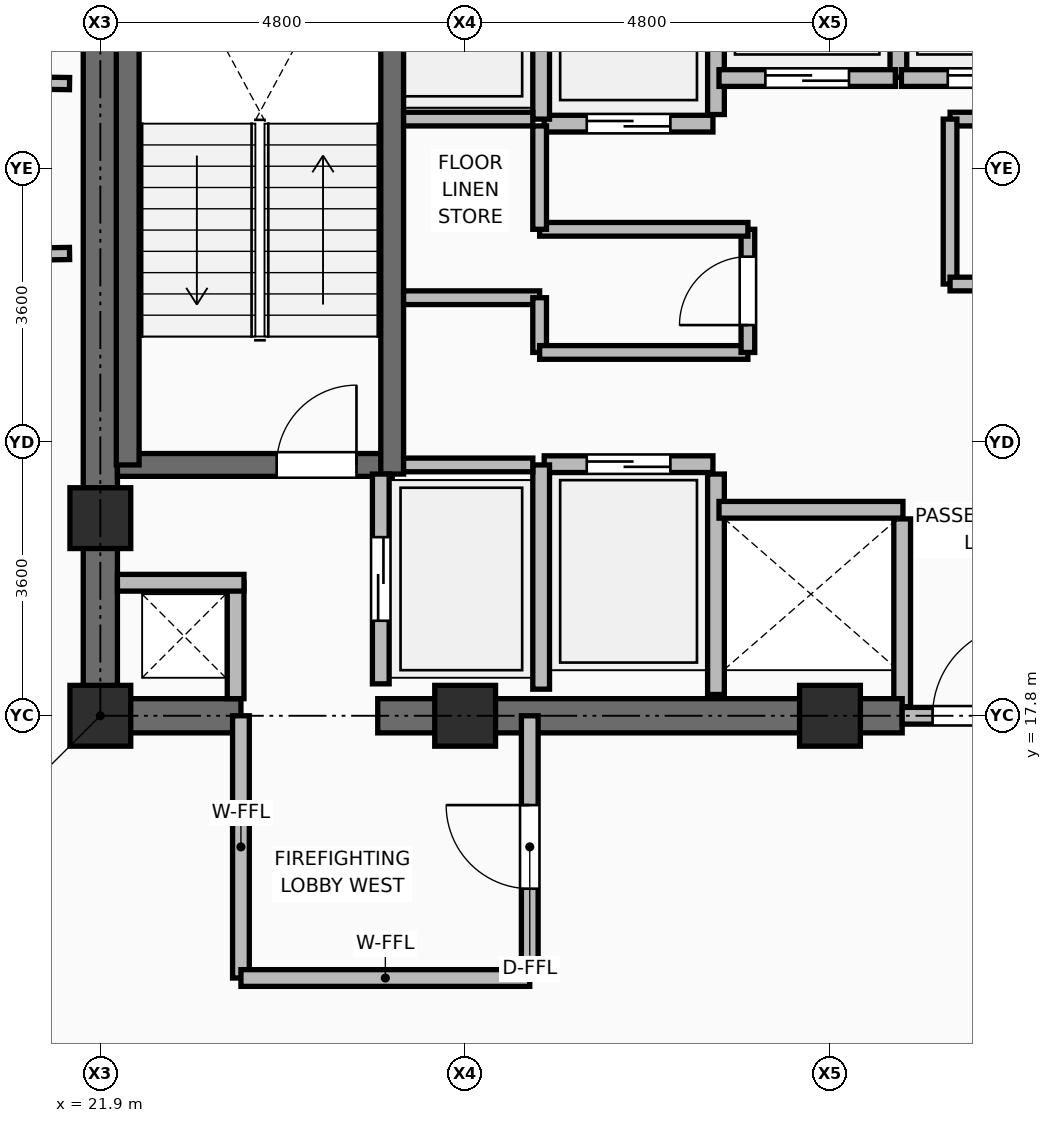
"""IFC4 building model, lengths in metres.
Left out: names, types, materials, properties, quantities, classifications, styles, units other than length and angle.
Written with IfcOpenShell. Run it as: python <this file> out.ifc"""

import sys

from ifc_helpers import new_model, si_unit, direction, frame, frame_2d, origin, origin_2d, place, context, subcontext, project, spatial, rectangle, extrude, element, fill, save


model = new_model("IFC4")
c1 = context("Model", 3, precision=1e-05, world=origin(), true_north=direction((0.0, 1.0)))
c2 = subcontext(c1, "Body", "Model", "MODEL_VIEW")
j1 = project(units=[si_unit("LENGTHUNIT", "METRE"), si_unit("PLANEANGLEUNIT", "RADIAN")], contexts=[c1])
p1 = place(None, origin())
s1 = spatial("IfcSite", under=j1, at=p1, CompositionType="ELEMENT")
p2 = place(p1, origin())
s2 = spatial("IfcBuilding", under=s1, at=p2, CompositionType="ELEMENT")
p3 = place(p2, frame((0.0, 0.0, 242.4)))
s3 = spatial("IfcBuildingStorey", under=s2, at=p3, CompositionType="ELEMENT", Elevation=242.4)
for number, where, z_axis, x_axis in (
    (1, (21.9, 17.8, 0.0), (0.0, 0.0, 1.0), (1.0, 0.0, 0.0)),
    (2, (26.7, 17.8, 0.0), (0.0, 0.0, 1.0), (1.0, 0.0, 0.0)),
    (3, (31.5, 17.8, 0.0), (0.0, 0.0, 1.0), (1.0, 0.0, 0.0)),
    (4, (21.9, 20.4, 0.0), (0.0, 0.0, 1.0), (1.0, 0.0, 0.0)),
):
    element("IfcColumn", number, at=place(p3, frame(where, z_axis=z_axis, x_axis=x_axis)), inside=s3, PredefinedType="COLUMN", context=c2, shape_type="SweptSolid", body=[
        extrude(rectangle(XDim=0.8, YDim=0.8, at=origin_2d()), origin(), (0.0, 0.0, 1.0), 3.75),
    ])
p4 = place(p3, frame((30.0, 18.08, 0.0), z_axis=(0.0, 0.0, 1.0), x_axis=(0.0, 1.0, 0.0)))
e5 = element("IfcWall", 5, at=p4, inside=s3, PredefinedType="PARTITIONING", context=c2, shape_type="SweptSolid", body=[
    extrude(rectangle(XDim=2.9, YDim=0.22, at=frame_2d((1.45, 0.0))), origin(), (0.0, 0.0, 1.0), 3.545),
])
p5 = place(p3, frame((32.45, 17.92, 0.0), z_axis=(0.0, 0.0, 1.0), x_axis=(0.0, 1.0, 0.0)))
e6 = element("IfcWall", 6, at=p5, inside=s3, PredefinedType="PARTITIONING", context=c2, shape_type="SweptSolid", body=[
    extrude(rectangle(XDim=2.47, YDim=0.22, at=frame_2d((1.235, 0.0))), origin(), (0.0, 0.0, 1.0), 3.545),
])
p6 = place(p3, frame((30.0, 25.71, 0.0), z_axis=(0.0, 0.0, 1.0), x_axis=(0.0, 1.0, 0.0)))
e7 = element("IfcWall", 7, at=p6, inside=s3, PredefinedType="PARTITIONING", context=c2, shape_type="SweptSolid", body=[
    extrude(rectangle(XDim=2.73, YDim=0.22, at=frame_2d((1.365, 0.0))), origin(), (0.0, 0.0, 1.0), 3.545),
])
p7 = place(p3, frame((32.4, 26.2, 0.0), z_axis=(0.0, 0.0, 1.0), x_axis=(0.0, 1.0, 0.0)))
e8 = element("IfcWall", 8, at=p7, inside=s3, PredefinedType="PARTITIONING", context=c2, shape_type="SweptSolid", body=[
    extrude(rectangle(XDim=2.24, YDim=0.22, at=frame_2d((1.12, 0.0))), origin(), (0.0, 0.0, 1.0), 3.545),
])
p8 = place(p3, frame((21.675, 17.8, 0.0), z_axis=(0.0, 0.0, 1.0), x_axis=(1.0, 0.0, 0.0)))
e9 = element("IfcWall", 9, at=p8, inside=s3, PredefinedType="SHEAR", context=c2, shape_type="SweptSolid", body=[
    extrude(rectangle(XDim=2.075, YDim=0.45, at=frame_2d((1.038, 0.0))), origin(), (0.0, 0.0, 1.0), 3.57),
])
p9 = place(p3, frame((25.55, 17.8, 0.0), z_axis=(0.0, 0.0, 1.0), x_axis=(1.0, 0.0, 0.0)))
e10 = element("IfcWall", 10, at=p9, inside=s3, PredefinedType="SHEAR", context=c2, shape_type="SweptSolid", body=[
    extrude(rectangle(XDim=6.9, YDim=0.45, at=frame_2d((3.45, 0.0))), origin(), (0.0, 0.0, 1.0), 3.57),
])
p10 = place(p3, frame((32.45, 17.8, 0.0), z_axis=(0.0, 0.0, 1.0), x_axis=(1.0, 0.0, 0.0)))
e11 = element("IfcWall", 11, at=p10, inside=s3, PredefinedType="PARTITIONING", context=c2, shape_type="SweptSolid", body=[
    extrude(rectangle(XDim=2.5, YDim=0.22, at=frame_2d((1.25, 0.0))), origin(), (0.0, 0.0, 1.0), 3.081),
])
p11 = place(p10, frame((0.4, 0.0, 0.0)))
e12 = element("IfcOpeningElement", 12, at=p11, cuts=e11, PredefinedType="OPENING", context=c2, shape_type="SweptSolid", body=[
    extrude(rectangle(XDim=1.2, YDim=2.1, at=frame_2d((0.6, 1.05))), frame((0.0, 0.12, 0.0), z_axis=(0.0, -1.0, 0.0), x_axis=(1.0, 0.0, 0.0)), (0.0, 0.0, 1.0), 0.24),
])
p12 = place(p3, frame((21.9, 18.025, 0.0), z_axis=(0.0, 0.0, 1.0), x_axis=(0.0, 1.0, 0.0)))
e13 = element("IfcWall", 13, at=p12, inside=s3, PredefinedType="SHEAR", context=c2, shape_type="SweptSolid", body=[
    extrude(rectangle(XDim=14.2, YDim=0.45, at=frame_2d((7.1, 0.0))), origin(), (0.0, 0.0, 1.0), 3.57),
])
p13 = place(p3, frame((22.125, 21.1, 0.0), z_axis=(0.0, 0.0, 1.0), x_axis=(1.0, 0.0, 0.0)))
e14 = element("IfcWall", 14, at=p13, inside=s3, PredefinedType="SHEAR", context=c2, shape_type="SweptSolid", body=[
    extrude(rectangle(XDim=3.615, YDim=0.3, at=frame_2d((1.808, 0.0))), origin(), (0.0, 0.0, 1.0), 3.57),
])
p14 = place(p13, frame((2.095, 0.0, 0.0)))
e15 = element("IfcOpeningElement", 15, at=p14, cuts=e14, PredefinedType="OPENING", context=c2, shape_type="SweptSolid", body=[
    extrude(rectangle(XDim=1.05, YDim=2.1, at=frame_2d((0.525, 1.05))), frame((0.0, 0.16, 0.0), z_axis=(0.0, -1.0, 0.0), x_axis=(1.0, 0.0, 0.0)), (0.0, 0.0, 1.0), 0.32),
])
p15 = place(p3, frame((25.74, 20.98, 0.0), z_axis=(0.0, 0.0, 1.0), x_axis=(0.0, 1.0, 0.0)))
e16 = element("IfcWall", 16, at=p15, inside=s3, PredefinedType="SHEAR", context=c2, shape_type="SweptSolid", body=[
    extrude(rectangle(XDim=7.99, YDim=0.3, at=frame_2d((3.995, 0.0))), origin(), (0.0, 0.0, 1.0), 3.57),
])
p16 = place(p3, frame((22.26, 21.1, 0.0), z_axis=(0.0, 0.0, 1.0), x_axis=(0.0, 1.0, 0.0)))
e17 = element("IfcWall", 17, at=p16, inside=s3, PredefinedType="SHEAR", context=c2, shape_type="SweptSolid", body=[
    extrude(rectangle(XDim=7.75, YDim=0.3, at=frame_2d((3.875, 0.0))), origin(), (0.0, 0.0, 1.0), 3.57),
])
p17 = place(p3, frame((23.68, 18.025, 0.0), z_axis=(0.0, 0.0, 1.0), x_axis=(0.0, 1.0, 0.0)))
e18 = element("IfcWall", 18, at=p17, inside=s3, PredefinedType="PARTITIONING", context=c2, shape_type="SweptSolid", body=[
    extrude(rectangle(XDim=1.525, YDim=0.22, at=frame_2d((0.763, 0.0))), origin(), (0.0, 0.0, 1.0), 3.55),
])
p18 = place(p3, frame((22.125, 19.55, 0.0), z_axis=(0.0, 0.0, 1.0), x_axis=(1.0, 0.0, 0.0)))
e19 = element("IfcWall", 19, at=p18, inside=s3, PredefinedType="PARTITIONING", context=c2, shape_type="SweptSolid", body=[
    extrude(rectangle(XDim=1.665, YDim=0.22, at=frame_2d((0.833, 0.0))), origin(), (0.0, 0.0, 1.0), 2.595),
])
p19 = place(p3, frame((25.59, 18.22, 0.0), z_axis=(0.0, 0.0, 1.0), x_axis=(0.0, 1.0, 0.0)))
e20 = element("IfcWall", 20, at=p19, inside=s3, PredefinedType="PARTITIONING", context=c2, shape_type="SweptSolid", body=[
    extrude(rectangle(XDim=2.76, YDim=0.22, at=frame_2d((1.38, 0.0))), origin(), (0.0, 0.0, 1.0), 3.55),
])
p20 = place(p19, frame((0.83, 0.0, 0.0)))
e21 = element("IfcOpeningElement", 21, at=p20, cuts=e20, PredefinedType="OPENING", context=c2, shape_type="SweptSolid", body=[
    extrude(rectangle(XDim=1.1, YDim=2.2, at=frame_2d((0.55, 1.1))), frame((0.0, 0.12, 0.0), z_axis=(0.0, -1.0, 0.0), x_axis=(1.0, 0.0, 0.0)), (0.0, 0.0, 1.0), 0.24),
])
p21 = place(p3, frame((27.74, 21.11, 0.0), z_axis=(0.0, 0.0, 1.0), x_axis=(1.0, 0.0, 0.0)))
e22 = element("IfcWall", 22, at=p21, inside=s3, PredefinedType="PARTITIONING", context=c2, shape_type="SweptSolid", body=[
    extrude(rectangle(XDim=2.22, YDim=0.22, at=frame_2d((1.11, 0.0))), origin(), (0.0, 0.0, 1.0), 3.55),
])
p22 = place(p21, frame((0.56, 0.0, 0.0)))
e23 = element("IfcOpeningElement", 23, at=p22, cuts=e22, PredefinedType="OPENING", context=c2, shape_type="SweptSolid", body=[
    extrude(rectangle(XDim=1.1, YDim=2.2, at=frame_2d((0.55, 1.1))), frame((0.0, 0.12, 0.0), z_axis=(0.0, -1.0, 0.0), x_axis=(1.0, 0.0, 0.0)), (0.0, 0.0, 1.0), 0.24),
])
p23 = place(p3, frame((27.74, 25.59, 0.0), z_axis=(0.0, 0.0, 1.0), x_axis=(1.0, 0.0, 0.0)))
e24 = element("IfcWall", 24, at=p23, inside=s3, PredefinedType="PARTITIONING", context=c2, shape_type="SweptSolid", body=[
    extrude(rectangle(XDim=2.22, YDim=0.22, at=frame_2d((1.11, 0.0))), origin(), (0.0, 0.0, 1.0), 3.55),
])
p24 = place(p23, frame((0.56, 0.0, 0.0)))
e25 = element("IfcOpeningElement", 25, at=p24, cuts=e24, PredefinedType="OPENING", context=c2, shape_type="SweptSolid", body=[
    extrude(rectangle(XDim=1.1, YDim=2.2, at=frame_2d((0.55, 1.1))), frame((0.0, 0.12, 0.0), z_axis=(0.0, -1.0, 0.0), x_axis=(1.0, 0.0, 0.0)), (0.0, 0.0, 1.0), 0.24),
])
p25 = place(p3, frame((30.04, 20.51, 0.0), z_axis=(0.0, 0.0, 1.0), x_axis=(1.0, 0.0, 0.0)))
e26 = element("IfcWall", 26, at=p25, inside=s3, PredefinedType="PARTITIONING", context=c2, shape_type="SweptSolid", body=[
    extrude(rectangle(XDim=2.42, YDim=0.22, at=frame_2d((1.21, 0.0))), origin(), (0.0, 0.0, 1.0), 3.55),
])
p26 = place(p3, frame((30.04, 26.19, 0.0), z_axis=(0.0, 0.0, 1.0), x_axis=(1.0, 0.0, 0.0)))
e27 = element("IfcWall", 27, at=p26, inside=s3, PredefinedType="PARTITIONING", context=c2, shape_type="SweptSolid", body=[
    extrude(rectangle(XDim=2.32, YDim=0.22, at=frame_2d((1.16, 0.0))), origin(), (0.0, 0.0, 1.0), 3.55),
])
p27 = place(p26, frame((0.61, 0.0, 0.0)))
e28 = element("IfcOpeningElement", 28, at=p27, cuts=e27, PredefinedType="OPENING", context=c2, shape_type="SweptSolid", body=[
    extrude(rectangle(XDim=1.1, YDim=2.2, at=frame_2d((0.55, 1.1))), frame((0.0, 0.12, 0.0), z_axis=(0.0, -1.0, 0.0), x_axis=(1.0, 0.0, 0.0)), (0.0, 0.0, 1.0), 0.24),
])
p28 = place(p3, frame((32.44, 26.19, 0.0), z_axis=(0.0, 0.0, 1.0), x_axis=(1.0, 0.0, 0.0)))
e29 = element("IfcWall", 29, at=p28, inside=s3, PredefinedType="PARTITIONING", context=c2, shape_type="SweptSolid", body=[
    extrude(rectangle(XDim=2.32, YDim=0.22, at=frame_2d((1.16, 0.0))), origin(), (0.0, 0.0, 1.0), 3.55),
])
p29 = place(p28, frame((0.61, 0.0, 0.0)))
e30 = element("IfcOpeningElement", 30, at=p29, cuts=e29, PredefinedType="OPENING", context=c2, shape_type="SweptSolid", body=[
    extrude(rectangle(XDim=1.1, YDim=2.2, at=frame_2d((0.55, 1.1))), frame((0.0, 0.12, 0.0), z_axis=(0.0, -1.0, 0.0), x_axis=(1.0, 0.0, 0.0)), (0.0, 0.0, 1.0), 0.24),
])
p30 = place(p3, frame((27.7, 18.15, 0.0), z_axis=(0.0, 0.0, 1.0), x_axis=(0.0, 1.0, 0.0)))
e31 = element("IfcWall", 31, at=p30, inside=s3, PredefinedType="PARTITIONING", context=c2, shape_type="SweptSolid", body=[
    extrude(rectangle(XDim=2.95, YDim=0.22, at=frame_2d((1.475, 0.0))), origin(), (0.0, 0.0, 1.0), 3.55),
])
p31 = place(p3, frame((27.7, 25.65, 0.0), z_axis=(0.0, 0.0, 1.0), x_axis=(0.0, 1.0, 0.0)))
e32 = element("IfcWall", 32, at=p31, inside=s3, PredefinedType="PARTITIONING", context=c2, shape_type="SweptSolid", body=[
    extrude(rectangle(XDim=3.0, YDim=0.22, at=frame_2d((1.5, 0.0))), origin(), (0.0, 0.0, 1.0), 3.55),
])
for number, where, z_axis, x_axis in (
    (33, (25.89, 21.1, 0.0), (0.0, 0.0, 1.0), (1.0, 0.0, 0.0)),
    (34, (25.89, 25.65, 0.0), (0.0, 0.0, 1.0), (1.0, 0.0, 0.0)),
):
    element("IfcWall", number, at=place(p3, frame(where, z_axis=z_axis, x_axis=x_axis)), inside=s3, PredefinedType="PARTITIONING", context=c2, shape_type="SweptSolid", body=[
        extrude(rectangle(XDim=1.7, YDim=0.18, at=frame_2d((0.85, 0.0))), origin(), (0.0, 0.0, 1.0), 3.55),
    ])
p32 = place(p3, frame((25.89, 23.3, 0.0), z_axis=(0.0, 0.0, 1.0), x_axis=(1.0, 0.0, 0.0)))
e35 = element("IfcWall", 35, at=p32, inside=s3, PredefinedType="PARTITIONING", context=c2, shape_type="SweptSolid", body=[
    extrude(rectangle(XDim=1.79, YDim=0.18, at=frame_2d((0.895, 0.0))), origin(), (0.0, 0.0, 1.0), 3.55),
])
p33 = place(p3, frame((27.68, 22.58, 0.0), z_axis=(0.0, 0.0, 1.0), x_axis=(0.0, 1.0, 0.0)))
e36 = element("IfcWall", 36, at=p33, inside=s3, PredefinedType="PARTITIONING", context=c2, shape_type="SweptSolid", body=[
    extrude(rectangle(XDim=0.72, YDim=0.18, at=frame_2d((0.36, 0.0))), origin(), (0.0, 0.0, 1.0), 3.55),
])
p34 = place(p3, frame((27.68, 22.58, 0.0), z_axis=(0.0, 0.0, 1.0), x_axis=(1.0, 0.0, 0.0)))
e37 = element("IfcWall", 37, at=p34, inside=s3, PredefinedType="PARTITIONING", context=c2, shape_type="SweptSolid", body=[
    extrude(rectangle(XDim=2.74, YDim=0.18, at=frame_2d((1.37, 0.0))), origin(), (0.0, 0.0, 1.0), 3.55),
])
p35 = place(p3, frame((30.42, 22.58, 0.0), z_axis=(0.0, 0.0, 1.0), x_axis=(0.0, 1.0, 0.0)))
e38 = element("IfcWall", 38, at=p35, inside=s3, PredefinedType="PARTITIONING", context=c2, shape_type="SweptSolid", body=[
    extrude(rectangle(XDim=1.62, YDim=0.18, at=frame_2d((0.81, 0.0))), origin(), (0.0, 0.0, 1.0), 3.55),
])
p36 = place(p35, frame((0.36, 0.0, 0.0)))
e39 = element("IfcOpeningElement", 39, at=p36, cuts=e38, PredefinedType="OPENING", context=c2, shape_type="SweptSolid", body=[
    extrude(rectangle(XDim=0.9, YDim=2.1, at=frame_2d((0.45, 1.05))), frame((0.0, 0.1, 0.0), z_axis=(0.0, -1.0, 0.0), x_axis=(1.0, 0.0, 0.0)), (0.0, 0.0, 1.0), 0.2),
])
p37 = place(p3, frame((27.68, 24.2, 0.0), z_axis=(0.0, 0.0, 1.0), x_axis=(1.0, 0.0, 0.0)))
e40 = element("IfcWall", 40, at=p37, inside=s3, PredefinedType="PARTITIONING", context=c2, shape_type="SweptSolid", body=[
    extrude(rectangle(XDim=2.74, YDim=0.18, at=frame_2d((1.37, 0.0))), origin(), (0.0, 0.0, 1.0), 3.55),
])
p38 = place(p3, frame((27.68, 24.2, 0.0), z_axis=(0.0, 0.0, 1.0), x_axis=(0.0, 1.0, 0.0)))
e41 = element("IfcWall", 41, at=p38, inside=s3, PredefinedType="PARTITIONING", context=c2, shape_type="SweptSolid", body=[
    extrude(rectangle(XDim=1.36, YDim=0.18, at=frame_2d((0.68, 0.0))), origin(), (0.0, 0.0, 1.0), 3.55),
])
p39 = place(p3, frame((33.08, 25.65, 0.0), z_axis=(0.0, 0.0, 1.0), x_axis=(1.0, 0.0, 0.0)))
e42 = element("IfcWall", 42, at=p39, inside=s3, PredefinedType="PARTITIONING", context=c2, shape_type="SweptSolid", body=[
    extrude(rectangle(XDim=1.68, YDim=0.18, at=frame_2d((0.84, 0.0))), origin(), (0.0, 0.0, 1.0), 3.55),
])
p40 = place(p3, frame((33.08, 23.48, 0.0), z_axis=(0.0, 0.0, 1.0), x_axis=(0.0, 1.0, 0.0)))
e43 = element("IfcWall", 43, at=p40, inside=s3, PredefinedType="PARTITIONING", context=c2, shape_type="SweptSolid", body=[
    extrude(rectangle(XDim=2.17, YDim=0.18, at=frame_2d((1.085, 0.0))), origin(), (0.0, 0.0, 1.0), 3.55),
])
p41 = place(p3, frame((33.08, 23.48, 0.0), z_axis=(0.0, 0.0, 1.0), x_axis=(1.0, 0.0, 0.0)))
e44 = element("IfcWall", 44, at=p41, inside=s3, PredefinedType="PARTITIONING", context=c2, shape_type="SweptSolid", body=[
    extrude(rectangle(XDim=1.84, YDim=0.18, at=frame_2d((0.92, 0.0))), origin(), (0.0, 0.0, 1.0), 3.55),
])
p42 = place(p3, frame((23.75, 14.35, 0.0), z_axis=(0.0, 0.0, 1.0), x_axis=(0.0, 1.0, 0.0)))
e45 = element("IfcWall", 45, at=p42, inside=s3, PredefinedType="PARTITIONING", context=c2, shape_type="SweptSolid", body=[
    extrude(rectangle(XDim=3.45, YDim=0.22, at=frame_2d((1.725, 0.0))), origin(), (0.0, 0.0, 1.0), 3.081),
])
p43 = place(p3, frame((23.75, 14.35, 0.0), z_axis=(0.0, 0.0, 1.0), x_axis=(1.0, 0.0, 0.0)))
e46 = element("IfcWall", 46, at=p43, inside=s3, PredefinedType="PARTITIONING", context=c2, shape_type="SweptSolid", body=[
    extrude(rectangle(XDim=3.8, YDim=0.22, at=frame_2d((1.9, 0.0))), origin(), (0.0, 0.0, 1.0), 3.55),
])
p44 = place(p3, frame((27.55, 14.35, 0.0), z_axis=(0.0, 0.0, 1.0), x_axis=(0.0, 1.0, 0.0)))
e47 = element("IfcWall", 47, at=p44, inside=s3, PredefinedType="PARTITIONING", context=c2, shape_type="SweptSolid", body=[
    extrude(rectangle(XDim=3.45, YDim=0.22, at=frame_2d((1.725, 0.0))), origin(), (0.0, 0.0, 1.0), 3.081),
])
p45 = place(p44, frame((1.175, 0.0, 0.0)))
e48 = element("IfcOpeningElement", 48, at=p45, cuts=e47, PredefinedType="OPENING", context=c2, shape_type="SweptSolid", body=[
    extrude(rectangle(XDim=1.1, YDim=2.1, at=frame_2d((0.55, 1.05))), frame((0.0, 0.12, 0.0), z_axis=(0.0, -1.0, 0.0), x_axis=(1.0, 0.0, 0.0)), (0.0, 0.0, 1.0), 0.24),
])
p46 = place(p3, frame((21.495, 26.117, 0.0), z_axis=(0.0, 0.0, 1.0), x_axis=(-0.999908537082, 0.013524698532, 0.0)))
e49 = element("IfcWall", 49, at=p46, inside=s3, PredefinedType="PARTITIONING", context=c2, shape_type="SweptSolid", body=[
    extrude(rectangle(XDim=1.859, YDim=0.16, at=frame_2d((0.93, 0.0))), origin(), (0.0, 0.0, 1.0), 2.595),
])
p47 = place(p3, frame((19.635, 23.854, 0.0), z_axis=(0.0, 0.0, 1.0), x_axis=(0.999886107392, 0.015092125259, 0.0)))
e50 = element("IfcWall", 50, at=p47, inside=s3, PredefinedType="PARTITIONING", context=c2, shape_type="SweptSolid", body=[
    extrude(rectangle(XDim=1.86, YDim=0.16, at=frame_2d((0.93, 0.0))), origin(), (0.0, 0.0, 1.0), 2.595),
])
p48 = place(p11, origin())
e51 = element("IfcDoor", 51, at=p48, inside=s3, OperationType="SINGLE_SWING_RIGHT", PredefinedType="DOOR", context=c2, shape_type="SweptSolid", body=[
    extrude(rectangle(XDim=1.2, YDim=2.1, at=frame_2d((0.6, 1.05))), frame((0.0, 0.025, 0.0), z_axis=(0.0, -1.0, 0.0), x_axis=(1.0, 0.0, 0.0)), (0.0, 0.0, 1.0), 0.05),
])
fill(e12, e51)
p49 = place(p14, origin())
e52 = element("IfcDoor", 52, at=p49, inside=s3, OperationType="SINGLE_SWING_RIGHT", PredefinedType="DOOR", context=c2, shape_type="SweptSolid", body=[
    extrude(rectangle(XDim=1.05, YDim=2.1, at=frame_2d((0.525, 1.05))), frame((0.0, 0.025, 0.0), z_axis=(0.0, -1.0, 0.0), x_axis=(1.0, 0.0, 0.0)), (0.0, 0.0, 1.0), 0.05),
])
fill(e15, e52)
p50 = place(p20, origin())
e53 = element("IfcDoor", 53, at=p50, inside=s3, OperationType="DOUBLE_DOOR_SLIDING", PredefinedType="DOOR", context=c2, shape_type="SweptSolid", body=[
    extrude(rectangle(XDim=1.1, YDim=2.2, at=frame_2d((0.55, 1.1))), frame((0.0, 0.025, 0.0), z_axis=(0.0, -1.0, 0.0), x_axis=(1.0, 0.0, 0.0)), (0.0, 0.0, 1.0), 0.05),
])
fill(e21, e53)
p51 = place(p22, origin())
e54 = element("IfcDoor", 54, at=p51, inside=s3, OperationType="DOUBLE_DOOR_SLIDING", PredefinedType="DOOR", context=c2, shape_type="SweptSolid", body=[
    extrude(rectangle(XDim=1.1, YDim=2.2, at=frame_2d((0.55, 1.1))), frame((0.0, 0.025, 0.0), z_axis=(0.0, -1.0, 0.0), x_axis=(1.0, 0.0, 0.0)), (0.0, 0.0, 1.0), 0.05),
])
fill(e23, e54)
p52 = place(p24, frame((1.1, 0.0, 0.0), z_axis=(0.0, 0.0, 1.0), x_axis=(-1.0, 0.0, 0.0)))
e55 = element("IfcDoor", 55, at=p52, inside=s3, OperationType="DOUBLE_DOOR_SLIDING", PredefinedType="DOOR", context=c2, shape_type="SweptSolid", body=[
    extrude(rectangle(XDim=1.1, YDim=2.2, at=frame_2d((0.55, 1.1))), frame((0.0, 0.025, 0.0), z_axis=(0.0, -1.0, 0.0), x_axis=(1.0, 0.0, 0.0)), (0.0, 0.0, 1.0), 0.05),
])
fill(e25, e55)
p53 = place(p27, frame((1.1, 0.0, 0.0), z_axis=(0.0, 0.0, 1.0), x_axis=(-1.0, 0.0, 0.0)))
e56 = element("IfcDoor", 56, at=p53, inside=s3, OperationType="DOUBLE_DOOR_SLIDING", PredefinedType="DOOR", context=c2, shape_type="SweptSolid", body=[
    extrude(rectangle(XDim=1.1, YDim=2.2, at=frame_2d((0.55, 1.1))), frame((0.0, 0.025, 0.0), z_axis=(0.0, -1.0, 0.0), x_axis=(1.0, 0.0, 0.0)), (0.0, 0.0, 1.0), 0.05),
])
fill(e28, e56)
p54 = place(p29, frame((1.1, 0.0, 0.0), z_axis=(0.0, 0.0, 1.0), x_axis=(-1.0, 0.0, 0.0)))
e57 = element("IfcDoor", 57, at=p54, inside=s3, OperationType="DOUBLE_DOOR_SLIDING", PredefinedType="DOOR", context=c2, shape_type="SweptSolid", body=[
    extrude(rectangle(XDim=1.1, YDim=2.2, at=frame_2d((0.55, 1.1))), frame((0.0, 0.025, 0.0), z_axis=(0.0, -1.0, 0.0), x_axis=(1.0, 0.0, 0.0)), (0.0, 0.0, 1.0), 0.05),
])
fill(e30, e57)
p55 = place(p36, origin())
e58 = element("IfcDoor", 58, at=p55, inside=s3, OperationType="SINGLE_SWING_LEFT", PredefinedType="DOOR", context=c2, shape_type="SweptSolid", body=[
    extrude(rectangle(XDim=0.9, YDim=2.1, at=frame_2d((0.45, 1.05))), frame((0.0, 0.025, 0.0), z_axis=(0.0, -1.0, 0.0), x_axis=(1.0, 0.0, 0.0)), (0.0, 0.0, 1.0), 0.05),
])
fill(e39, e58)
p56 = place(p45, origin())
e59 = element("IfcDoor", 59, at=p56, inside=s3, OperationType="SINGLE_SWING_RIGHT", PredefinedType="DOOR", context=c2, shape_type="SweptSolid", body=[
    extrude(rectangle(XDim=1.1, YDim=2.1, at=frame_2d((0.55, 1.05))), frame((0.0, 0.025, 0.0), z_axis=(0.0, -1.0, 0.0), x_axis=(1.0, 0.0, 0.0)), (0.0, 0.0, 1.0), 0.05),
])
fill(e48, e59)
save(model, sys.argv[1])
